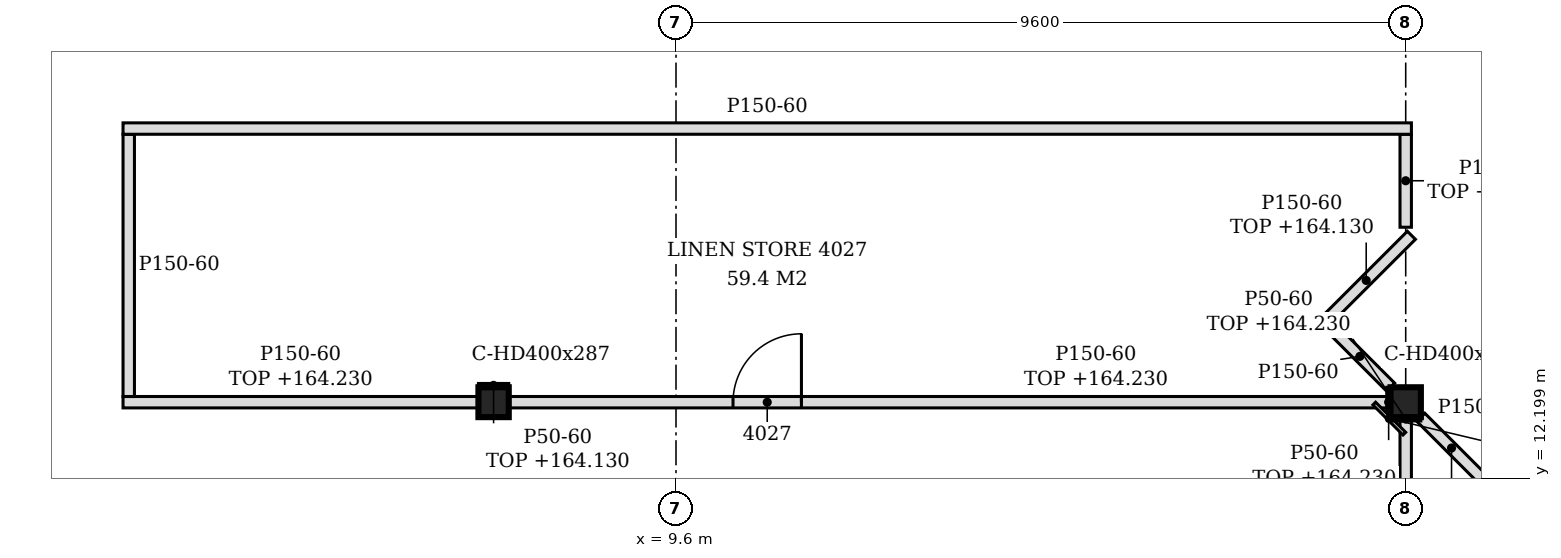
"""IFC4 building model, lengths in metres.
Left out: names, types, materials, properties, quantities, classifications, styles, units other than length and angle.
Written with IfcOpenShell. Run it as: python <this file> out.ifc"""

import sys

from ifc_helpers import new_model, si_unit, direction, frame, frame_2d, origin, origin_2d, place, context, subcontext, project, spatial, polyline, rectangle, i_section, outline, extrude, element, fill, save


model = new_model("IFC4")
c1 = context("Model", 3, precision=1e-05, world=origin(), true_north=direction((0.0, 1.0)))
c2 = subcontext(c1, "Body", "Model", "MODEL_VIEW")
j1 = project(units=[si_unit("LENGTHUNIT", "METRE"), si_unit("PLANEANGLEUNIT", "RADIAN")], contexts=[c1])
p1 = place(None, origin())
s1 = spatial("IfcSite", under=j1, at=p1, CompositionType="ELEMENT")
p2 = place(p1, origin())
s2 = spatial("IfcBuilding", under=s1, at=p2, CompositionType="ELEMENT")
p3 = place(p2, frame((0.0, 0.0, 161.4)))
s3 = spatial("IfcBuildingStorey", under=s2, at=p3, CompositionType="ELEMENT", Elevation=161.4)
for number, where, z_axis, x_axis in (
    (1, (7.2, 13.2, -0.15), (0.0, 0.0, 1.0), (1.0, 0.0, 0.0)),
    (2, (19.2, 13.2, -0.15), (0.0, 0.0, 1.0), (1.0, 0.0, 0.0)),
):
    element("IfcColumn", number, at=place(p3, frame(where, z_axis=z_axis, x_axis=x_axis)), inside=s3, PredefinedType="COLUMN", context=c2, shape_type="SweptSolid", body=[
        extrude(i_section(OverallWidth=0.399, OverallDepth=0.393, WebThickness=0.023, FlangeThickness=0.037, FilletRadius=0.015, at=origin_2d()), origin(), (0.0, 0.0, 1.0), 3.6),
    ])
p4 = place(p3, frame((19.2, 2.596, 0.0), z_axis=(0.0, 0.0, 1.0), x_axis=(0.0, 1.0, 0.0)))
e3 = element("IfcWall", 3, at=p4, inside=s3, PredefinedType="PARTITIONING", context=c2, shape_type="SweptSolid", body=[
    extrude(rectangle(XDim=10.407, YDim=0.15, at=frame_2d((5.204, 0.0))), origin(), (0.0, 0.0, 1.0), 2.83),
])
p5 = place(p4, frame((0.553, 0.0, 0.0)))
e4 = element("IfcOpeningElement", 4, at=p5, cuts=e3, PredefinedType="OPENING", context=c2, shape_type="SweptSolid", body=[
    extrude(rectangle(XDim=0.9, YDim=2.1, at=frame_2d((0.45, 1.05))), frame((0.0, 0.085, 0.0), z_axis=(0.0, -1.0, 0.0), x_axis=(1.0, 0.0, 0.0)), (0.0, 0.0, 1.0), 0.17),
])
p6 = place(p3, frame((20.208, 12.086, 0.0), z_axis=(0.0, 0.0, 1.0), x_axis=(0.706756381459, 0.707457007363, 0.0)))
e5 = element("IfcWall", 5, at=p6, inside=s3, PredefinedType="PARTITIONING", context=c2, shape_type="SweptSolid", body=[
    extrude(rectangle(XDim=1.394, YDim=0.15, at=frame_2d((0.697, 0.0))), origin(), (0.0, 0.0, 1.0), 3.45),
])
p7 = place(p3, frame((20.208, 12.192, 0.0), z_axis=(0.0, 0.0, 1.0), x_axis=(-0.70721334539, 0.707000200921, 0.0)))
e6 = element("IfcWall", 6, at=p7, inside=s3, PredefinedType="PARTITIONING", context=c2, shape_type="SweptSolid", body=[
    extrude(rectangle(XDim=1.146, YDim=0.15, at=frame_2d((0.573, 0.0))), origin(), (0.0, 0.0, 1.0), 3.45),
])
p8 = place(p3, frame((2.325, 13.2, 0.0), z_axis=(0.0, 0.0, 1.0), x_axis=(1.0, 0.0, 0.0)))
e7 = element("IfcWall", 7, at=p8, inside=s3, PredefinedType="PARTITIONING", context=c2, shape_type="SweptSolid", body=[
    extrude(rectangle(XDim=4.676, YDim=0.15, at=frame_2d((2.338, 0.0))), origin(), (0.0, 0.0, 1.0), 2.83),
])
p9 = place(p3, frame((7.399, 13.2, 0.0), z_axis=(0.0, 0.0, 1.0), x_axis=(1.0, 0.0, 0.0)))
e8 = element("IfcWall", 8, at=p9, inside=s3, PredefinedType="PARTITIONING", context=c2, shape_type="SweptSolid", body=[
    extrude(rectangle(XDim=11.601, YDim=0.15, at=frame_2d((5.801, 0.0))), origin(), (0.0, 0.0, 1.0), 2.83),
])
p10 = place(p9, frame((2.95, 0.0, 0.0)))
e9 = element("IfcOpeningElement", 9, at=p10, cuts=e8, PredefinedType="OPENING", context=c2, shape_type="SweptSolid", body=[
    extrude(rectangle(XDim=0.9, YDim=2.1, at=frame_2d((0.45, 1.05))), frame((0.0, 0.085, 0.0), z_axis=(0.0, -1.0, 0.0), x_axis=(1.0, 0.0, 0.0)), (0.0, 0.0, 1.0), 0.17),
])
p11 = place(p3, frame((2.4, 13.275, 0.0), z_axis=(0.0, 0.0, 1.0), x_axis=(0.0, 1.0, 0.0)))
e10 = element("IfcWall", 10, at=p11, inside=s3, PredefinedType="PARTITIONING", context=c2, shape_type="SweptSolid", body=[
    extrude(outline(polyline([(0.0, 0.0), (3.45, 0.0), (3.45, 3.45), (0.075, 3.45), (0.073, 2.83), (0.0, 2.83), (0.0, 0.0)])), frame((0.0, 0.075, 0.0), z_axis=(0.0, -1.0, 0.0), x_axis=(1.0, 0.0, 0.0)), (0.0, 0.0, 1.0), 0.15),
])
p12 = place(p3, frame((19.002, 13.398, 0.0), z_axis=(0.0, 0.0, 1.0), x_axis=(-0.707000200921, 0.70721334539, 0.0)))
e11 = element("IfcWall", 11, at=p12, inside=s3, PredefinedType="PARTITIONING", context=c2, shape_type="SweptSolid", body=[
    extrude(rectangle(XDim=1.146, YDim=0.15, at=frame_2d((0.573, 0.0))), origin(), (0.0, 0.0, 1.0), 3.45),
])
p13 = place(p3, frame((18.086, 14.208, 0.0), z_axis=(0.0, 0.0, 1.0), x_axis=(0.70739723372, 0.706816209298, 0.0)))
e12 = element("IfcWall", 12, at=p13, inside=s3, PredefinedType="PARTITIONING", context=c2, shape_type="SweptSolid", body=[
    extrude(rectangle(XDim=1.681, YDim=0.15, at=frame_2d((0.84, 0.0))), origin(), (0.0, 0.0, 1.0), 2.73),
])
p14 = place(p3, frame((19.2, 15.502, 0.0), z_axis=(0.0, 0.0, 1.0), x_axis=(0.0, 1.0, 0.0)))
e13 = element("IfcWall", 13, at=p14, inside=s3, PredefinedType="PARTITIONING", context=c2, shape_type="SweptSolid", body=[
    extrude(rectangle(XDim=1.223, YDim=0.15, at=frame_2d((0.612, 0.0))), origin(), (0.0, 0.0, 1.0), 2.73),
])
p15 = place(p3, frame((2.325, 16.8, 0.0), z_axis=(0.0, 0.0, 1.0), x_axis=(1.0, 0.0, 0.0)))
e14 = element("IfcWall", 14, at=p15, inside=s3, PredefinedType="PARTITIONING", context=c2, shape_type="SweptSolid", body=[
    extrude(outline(polyline([(0.0, 0.0), (16.95, 0.0), (16.95, 2.73), (16.725, 2.73), (16.723, 3.45), (5.025, 3.45), (5.023, 2.73), (4.725, 2.73), (4.723, 3.45), (0.0, 3.45), (0.0, 0.0)])), frame((0.0, 0.075, 0.0), z_axis=(0.0, -1.0, 0.0), x_axis=(1.0, 0.0, 0.0)), (0.0, 0.0, 1.0), 0.15),
])
p16 = place(p3, frame((18.976, 13.003, 0.0), z_axis=(0.0, 0.0, 1.0), x_axis=(0.0, 1.0, 0.0)))
e15 = element("IfcWall", 15, at=p16, inside=s3, PredefinedType="PARTITIONING", context=c2, shape_type="SweptSolid", body=[
    extrude(rectangle(XDim=0.393, YDim=0.05, at=frame_2d((0.197, 0.0))), origin(), (0.0, 0.0, 1.0), 2.83),
])
p17 = place(p3, frame((19.182, 12.786, 0.0), z_axis=(0.0, 0.0, 1.0), x_axis=(-0.707106781187, 0.707106781187, 0.0)))
e16 = element("IfcWall", 16, at=p17, inside=s3, PredefinedType="PARTITIONING", context=c2, shape_type="SweptSolid", body=[
    extrude(rectangle(XDim=0.56, YDim=0.05, at=frame_2d((0.28, 0.0))), origin(), (0.0, 0.0, 1.0), 2.83),
])
p18 = place(p3, frame((7.0, 13.421, 0.0), z_axis=(0.0, 0.0, 1.0), x_axis=(1.0, 0.0, 0.0)))
e17 = element("IfcWall", 17, at=p18, inside=s3, PredefinedType="PARTITIONING", context=c2, shape_type="SweptSolid", body=[
    extrude(rectangle(XDim=0.399, YDim=0.05, at=frame_2d((0.199, 0.0))), origin(), (0.0, 0.0, 1.0), 2.73),
])
p19 = place(p3, frame((19.0, 12.979, 0.0), z_axis=(0.0, 0.0, 1.0), x_axis=(1.0, 0.0, 0.0)))
e18 = element("IfcWall", 18, at=p19, inside=s3, PredefinedType="PARTITIONING", context=c2, shape_type="SweptSolid", body=[
    extrude(rectangle(XDim=0.399, YDim=0.05, at=frame_2d((0.199, 0.0))), origin(), (0.0, 0.0, 1.0), 2.83),
])
p20 = place(p10, origin())
e19 = element("IfcDoor", 19, at=p20, inside=s3, OperationType="SINGLE_SWING_RIGHT", PredefinedType="DOOR", context=c2, shape_type="SweptSolid", body=[
    extrude(rectangle(XDim=0.9, YDim=2.1, at=frame_2d((0.45, 1.05))), frame((0.0, 0.025, 0.0), z_axis=(0.0, -1.0, 0.0), x_axis=(1.0, 0.0, 0.0)), (0.0, 0.0, 1.0), 0.05),
])
fill(e9, e19)
save(model, sys.argv[1])
